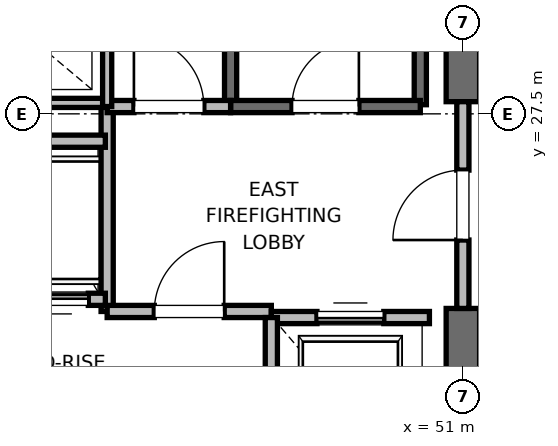
"""IFC4 building model, lengths in metres.
Left out: names, types, materials, properties, quantities, classifications, styles, units other than length and angle.
Written with IfcOpenShell. Run it as: python <this file> out.ifc"""

import sys

from ifc_helpers import new_model, si_unit, direction, frame, frame_2d, origin, place, context, subcontext, project, spatial, rectangle, extrude, element, fill, save


model = new_model("IFC4")
c1 = context("Model", 3, precision=1e-05, world=origin(), true_north=direction((0.0, 1.0)))
c2 = subcontext(c1, "Body", "Model", "MODEL_VIEW")
j1 = project(units=[si_unit("LENGTHUNIT", "METRE"), si_unit("PLANEANGLEUNIT", "RADIAN")], contexts=[c1])
p1 = place(None, origin())
s1 = spatial("IfcSite", under=j1, at=p1, CompositionType="ELEMENT")
p2 = place(p1, origin())
s2 = spatial("IfcBuilding", under=s1, at=p2, CompositionType="ELEMENT")
p3 = place(p2, frame((0.0, 0.0, 176.4)))
s3 = spatial("IfcBuildingStorey", under=s2, at=p3, CompositionType="ELEMENT", Elevation=176.4)
p4 = place(p3, frame((51.0, 18.5, 0.0), z_axis=(0.0, 0.0, 1.0), x_axis=(0.0, 1.0, 0.0)))
e1 = element("IfcWall", 1, at=p4, inside=s3, PredefinedType="SHEAR", context=c2, shape_type="SweptSolid", body=[
    extrude(rectangle(XDim=5.8, YDim=0.55, at=frame_2d((2.9, 0.0))), origin(), (0.0, 0.0, 1.0), 3.775),
])
p5 = place(p3, frame((51.0, 27.7, 0.0), z_axis=(0.0, 0.0, 1.0), x_axis=(0.0, 1.0, 0.0)))
e2 = element("IfcWall", 2, at=p5, inside=s3, PredefinedType="SHEAR", context=c2, shape_type="SweptSolid", body=[
    extrude(rectangle(XDim=8.8, YDim=0.55, at=frame_2d((4.4, 0.0))), origin(), (0.0, 0.0, 1.0), 3.775),
])
p6 = place(p3, frame((50.3, 27.65, 0.0), z_axis=(0.0, 0.0, 1.0), x_axis=(0.0, 1.0, 0.0)))
e3 = element("IfcWall", 3, at=p6, inside=s3, PredefinedType="SOLIDWALL", context=c2, shape_type="SweptSolid", body=[
    extrude(rectangle(XDim=8.15, YDim=0.2, at=frame_2d((4.075, 0.0))), origin(), (0.0, 0.0, 1.0), 3.775),
])
p7 = place(p3, frame((47.18, 27.62, 0.0), z_axis=(0.0, 0.0, 1.0), x_axis=(0.0, 1.0, 0.0)))
e4 = element("IfcWall", 4, at=p7, inside=s3, PredefinedType="SOLIDWALL", context=c2, shape_type="SweptSolid", body=[
    extrude(rectangle(XDim=8.18, YDim=0.2, at=frame_2d((4.09, 0.0))), origin(), (0.0, 0.0, 1.0), 3.775),
])
p8 = place(p3, frame((47.18, 27.62, 0.0), z_axis=(0.0, 0.0, 1.0), x_axis=(1.0, 0.0, 0.0)))
e5 = element("IfcWall", 5, at=p8, inside=s3, PredefinedType="SOLIDWALL", context=c2, shape_type="SweptSolid", body=[
    extrude(rectangle(XDim=3.12, YDim=0.2, at=frame_2d((1.56, 0.0))), origin(), (0.0, 0.0, 1.0), 3.775),
])
p9 = place(p8, frame((1.01, 0.0, 0.0)))
e6 = element("IfcOpeningElement", 6, at=p9, cuts=e5, PredefinedType="OPENING", context=c2, shape_type="SweptSolid", body=[
    extrude(rectangle(XDim=1.1, YDim=2.15, at=frame_2d((0.55, 1.075))), frame((0.0, 0.1, 0.0), z_axis=(0.0, -1.0, 0.0), x_axis=(1.0, 0.0, 0.0)), (0.0, 0.0, 1.0), 0.2),
])
p10 = place(p3, frame((45.15, 24.25, 0.0), z_axis=(0.0, 0.0, 1.0), x_axis=(0.0, 1.0, 0.0)))
e7 = element("IfcWall", 7, at=p10, inside=s3, PredefinedType="PARTITIONING", context=c2, shape_type="SweptSolid", body=[
    extrude(rectangle(XDim=3.37, YDim=0.2, at=frame_2d((1.685, 0.0))), origin(), (0.0, 0.0, 1.0), 3.775),
])
p11 = place(p3, frame((45.15, 24.25, 0.0), z_axis=(0.0, 0.0, 1.0), x_axis=(1.0, 0.0, 0.0)))
e8 = element("IfcWall", 8, at=p11, inside=s3, PredefinedType="PARTITIONING", context=c2, shape_type="SweptSolid", body=[
    extrude(rectangle(XDim=2.7, YDim=0.2, at=frame_2d((1.35, 0.0))), origin(), (0.0, 0.0, 1.0), 3.775),
])
p12 = place(p11, frame((0.775, 0.0, 0.0)))
e9 = element("IfcOpeningElement", 9, at=p12, cuts=e8, PredefinedType="OPENING", context=c2, shape_type="SweptSolid", body=[
    extrude(rectangle(XDim=1.15, YDim=2.2, at=frame_2d((0.575, 1.1))), frame((0.0, 0.1, 0.0), z_axis=(0.0, -1.0, 0.0), x_axis=(1.0, 0.0, 0.0)), (0.0, 0.0, 1.0), 0.2),
])
p13 = place(p3, frame((45.15, 27.62, 0.0), z_axis=(0.0, 0.0, 1.0), x_axis=(1.0, 0.0, 0.0)))
e10 = element("IfcWall", 10, at=p13, inside=s3, PredefinedType="PARTITIONING", context=c2, shape_type="SweptSolid", body=[
    extrude(rectangle(XDim=2.03, YDim=0.2, at=frame_2d((1.015, 0.0))), origin(), (0.0, 0.0, 1.0), 3.775),
])
p14 = place(p13, frame((0.44, 0.0, 0.0)))
e11 = element("IfcOpeningElement", 11, at=p14, cuts=e10, PredefinedType="OPENING", context=c2, shape_type="SweptSolid", body=[
    extrude(rectangle(XDim=1.15, YDim=2.2, at=frame_2d((0.575, 1.1))), frame((0.0, 0.1, 0.0), z_axis=(0.0, -1.0, 0.0), x_axis=(1.0, 0.0, 0.0)), (0.0, 0.0, 1.0), 0.2),
])
p15 = place(p3, frame((51.0, 24.3, 0.0), z_axis=(0.0, 0.0, 1.0), x_axis=(0.0, 1.0, 0.0)))
e12 = element("IfcWall", 12, at=p15, inside=s3, PredefinedType="PARTITIONING", context=c2, shape_type="SweptSolid", body=[
    extrude(rectangle(XDim=3.4, YDim=0.2, at=frame_2d((1.7, 0.0))), origin(), (0.0, 0.0, 1.0), 2.755),
])
p16 = place(p15, frame((1.125, 0.0, 0.0)))
e13 = element("IfcOpeningElement", 13, at=p16, cuts=e12, PredefinedType="OPENING", context=c2, shape_type="SweptSolid", body=[
    extrude(rectangle(XDim=1.15, YDim=2.2, at=frame_2d((0.575, 1.1))), frame((0.0, 0.1, 0.0), z_axis=(0.0, -1.0, 0.0), x_axis=(1.0, 0.0, 0.0)), (0.0, 0.0, 1.0), 0.2),
])
p17 = place(p3, frame((50.45, 24.15, 0.0), z_axis=(0.0, 0.0, 1.0), x_axis=(-1.0, 0.0, 0.0)))
e14 = element("IfcWall", 14, at=p17, inside=s3, PredefinedType="SOLIDWALL", context=c2, shape_type="SweptSolid", body=[
    extrude(rectangle(XDim=2.6, YDim=0.2, at=frame_2d((1.3, 0.0))), origin(), (0.0, 0.0, 1.0), 2.755),
])
p18 = place(p17, frame((0.75, 0.0, 0.0)))
e15 = element("IfcOpeningElement", 15, at=p18, cuts=e14, PredefinedType="OPENING", context=c2, shape_type="SweptSolid", body=[
    extrude(rectangle(XDim=1.1, YDim=2.2, at=frame_2d((0.55, 1.1))), frame((0.0, 0.1, 0.0), z_axis=(0.0, -1.0, 0.0), x_axis=(1.0, 0.0, 0.0)), (0.0, 0.0, 1.0), 0.2),
])
p19 = place(p3, frame((47.85, 24.15, 0.0), z_axis=(0.0, 0.0, 1.0), x_axis=(0.0, -1.0, 0.0)))
e16 = element("IfcWall", 16, at=p19, inside=s3, PredefinedType="SOLIDWALL", context=c2, shape_type="SweptSolid", body=[
    extrude(rectangle(XDim=3.0, YDim=0.2, at=frame_2d((1.5, 0.0))), origin(), (0.0, 0.0, 1.0), 3.775),
])
p20 = place(p3, frame((43.46, 24.45, 0.0), z_axis=(0.0, 0.0, 1.0), x_axis=(1.0, 0.0, 0.0)))
e17 = element("IfcWall", 17, at=p20, inside=s3, PredefinedType="SOLIDWALL", context=c2, shape_type="SweptSolid", body=[
    extrude(rectangle(XDim=1.66, YDim=0.2, at=frame_2d((0.83, 0.0))), origin(), (0.0, 0.0, 1.0), 3.775),
])
p21 = place(p20, frame((0.28, 0.0, 0.0)))
e18 = element("IfcOpeningElement", 18, at=p21, cuts=e17, PredefinedType="OPENING", context=c2, shape_type="SweptSolid", body=[
    extrude(rectangle(XDim=1.1, YDim=2.2, at=frame_2d((0.55, 1.1))), frame((0.0, 0.1, 0.0), z_axis=(0.0, -1.0, 0.0), x_axis=(1.0, 0.0, 0.0)), (0.0, 0.0, 1.0), 0.2),
])
p22 = place(p3, frame((45.12, 27.05, 0.0), z_axis=(0.0, 0.0, 1.0), x_axis=(-1.0, 0.0, 0.0)))
e19 = element("IfcWall", 19, at=p22, inside=s3, PredefinedType="SOLIDWALL", context=c2, shape_type="SweptSolid", body=[
    extrude(rectangle(XDim=1.66, YDim=0.2, at=frame_2d((0.83, 0.0))), origin(), (0.0, 0.0, 1.0), 3.775),
])
p23 = place(p3, frame((41.56, 27.68, 0.0), z_axis=(0.0, 0.0, 1.0), x_axis=(1.0, 0.0, 0.0)))
e20 = element("IfcWall", 20, at=p23, inside=s3, PredefinedType="PARTITIONING", context=c2, shape_type="SweptSolid", body=[
    extrude(rectangle(XDim=3.59, YDim=0.15, at=frame_2d((1.795, 0.0))), origin(), (0.0, 0.0, 1.0), 2.85),
])
p24 = place(p3, frame((45.15, 27.62, 0.0), z_axis=(0.0, 0.0, 1.0), x_axis=(0.0, 1.0, 0.0)))
e21 = element("IfcWall", 21, at=p24, inside=s3, PredefinedType="PARTITIONING", context=c2, shape_type="SweptSolid", body=[
    extrude(rectangle(XDim=3.1, YDim=0.15, at=frame_2d((1.55, 0.0))), origin(), (0.0, 0.0, 1.0), 2.85),
])
p25 = place(p9, origin())
e22 = element("IfcDoor", 22, at=p25, inside=s3, OperationType="SINGLE_SWING_RIGHT", PredefinedType="DOOR", context=c2, shape_type="SweptSolid", body=[
    extrude(rectangle(XDim=1.1, YDim=2.15, at=frame_2d((0.55, 1.075))), frame((0.0, 0.025, 0.0), z_axis=(0.0, -1.0, 0.0), x_axis=(1.0, 0.0, 0.0)), (0.0, 0.0, 1.0), 0.05),
])
fill(e6, e22)
p26 = place(p12, origin())
e23 = element("IfcDoor", 23, at=p26, inside=s3, OperationType="SINGLE_SWING_RIGHT", PredefinedType="DOOR", context=c2, shape_type="SweptSolid", body=[
    extrude(rectangle(XDim=1.15, YDim=2.2, at=frame_2d((0.575, 1.1))), frame((0.0, 0.025, 0.0), z_axis=(0.0, -1.0, 0.0), x_axis=(1.0, 0.0, 0.0)), (0.0, 0.0, 1.0), 0.05),
])
fill(e9, e23)
p27 = place(p14, origin())
e24 = element("IfcDoor", 24, at=p27, inside=s3, OperationType="SINGLE_SWING_LEFT", PredefinedType="DOOR", context=c2, shape_type="SweptSolid", body=[
    extrude(rectangle(XDim=1.15, YDim=2.2, at=frame_2d((0.575, 1.1))), frame((0.0, 0.025, 0.0), z_axis=(0.0, -1.0, 0.0), x_axis=(1.0, 0.0, 0.0)), (0.0, 0.0, 1.0), 0.05),
])
fill(e11, e24)
p28 = place(p16, origin())
e25 = element("IfcDoor", 25, at=p28, inside=s3, OperationType="SINGLE_SWING_LEFT", PredefinedType="DOOR", context=c2, shape_type="SweptSolid", body=[
    extrude(rectangle(XDim=1.15, YDim=2.2, at=frame_2d((0.575, 1.1))), frame((0.0, 0.025, 0.0), z_axis=(0.0, -1.0, 0.0), x_axis=(1.0, 0.0, 0.0)), (0.0, 0.0, 1.0), 0.05),
])
fill(e13, e25)
p29 = place(p18, origin())
e26 = element("IfcDoor", 26, at=p29, inside=s3, OperationType="SLIDING_TO_RIGHT", PredefinedType="DOOR", context=c2, shape_type="SweptSolid", body=[
    extrude(rectangle(XDim=1.1, YDim=2.2, at=frame_2d((0.55, 1.1))), frame((0.0, 0.025, 0.0), z_axis=(0.0, -1.0, 0.0), x_axis=(1.0, 0.0, 0.0)), (0.0, 0.0, 1.0), 0.05),
])
fill(e15, e26)
p30 = place(p21, origin())
e27 = element("IfcDoor", 27, at=p30, inside=s3, OperationType="SLIDING_TO_RIGHT", PredefinedType="DOOR", context=c2, shape_type="SweptSolid", body=[
    extrude(rectangle(XDim=1.1, YDim=2.2, at=frame_2d((0.55, 1.1))), frame((0.0, 0.025, 0.0), z_axis=(0.0, -1.0, 0.0), x_axis=(1.0, 0.0, 0.0)), (0.0, 0.0, 1.0), 0.05),
])
fill(e18, e27)
save(model, sys.argv[1])
